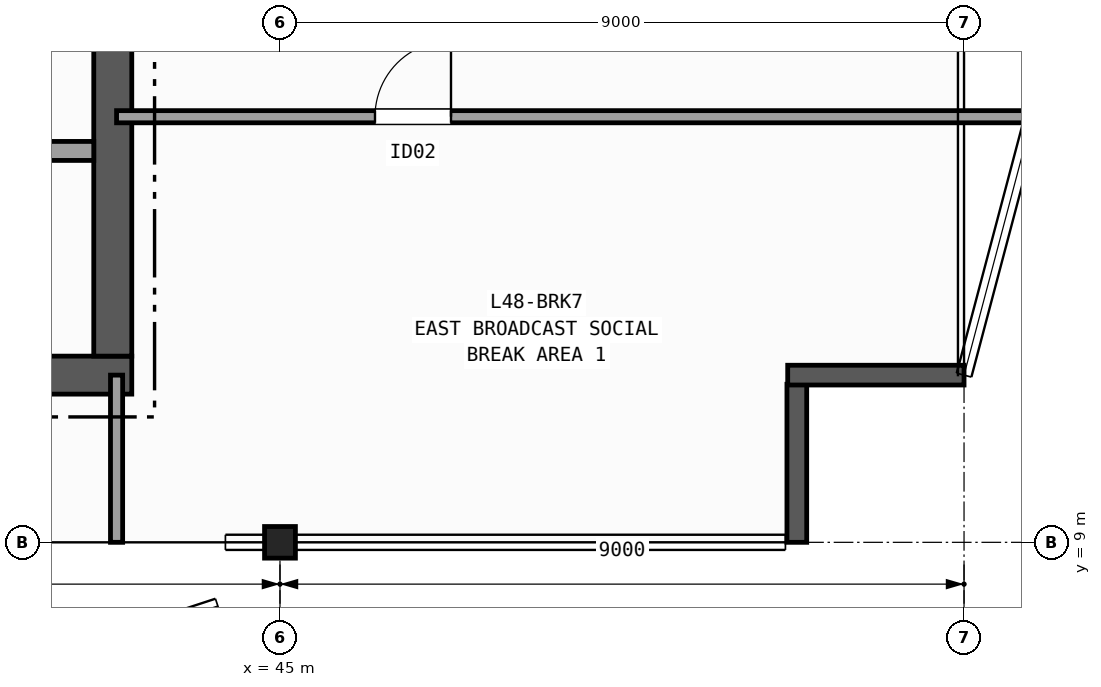
"""IFC4 building model, lengths in metres.
Left out: names, types, materials, properties, quantities, classifications, styles, units other than length and angle.
Written with IfcOpenShell. Run it as: python <this file> out.ifc"""

import sys

from ifc_helpers import new_model, si_unit, direction, frame, frame_2d, origin, origin_2d, place, context, subcontext, project, spatial, rectangle, i_section, extrude, element, fill, save


model = new_model("IFC4")
c1 = context("Model", 3, precision=1e-05, world=origin(), true_north=direction((0.0, 1.0)))
c2 = subcontext(c1, "Body", "Model", "MODEL_VIEW")
j1 = project(units=[si_unit("LENGTHUNIT", "METRE"), si_unit("PLANEANGLEUNIT", "RADIAN")], contexts=[c1])
p1 = place(None, origin())
s1 = spatial("IfcSite", under=j1, at=p1, CompositionType="ELEMENT")
p2 = place(p1, origin())
s2 = spatial("IfcBuilding", under=s1, at=p2, CompositionType="ELEMENT")
p3 = place(p2, frame((0.0, 0.0, 192.7)))
s3 = spatial("IfcBuildingStorey", under=s2, at=p3, CompositionType="ELEMENT", Elevation=192.7)
p4 = place(p3, frame((45.0, 9.0, 0.0), z_axis=(0.0, 0.0, 1.0), x_axis=(1.0, 0.0, 0.0)))
e1 = element("IfcColumn", 1, at=p4, inside=s3, PredefinedType="COLUMN", context=c2, shape_type="SweptSolid", body=[
    extrude(i_section(OverallWidth=0.406, OverallDepth=0.416, WebThickness=0.03, FlangeThickness=0.048, FilletRadius=0.015, at=origin_2d()), origin(), (0.0, 0.0, 1.0), 3.7),
])
p5 = place(p3, frame((51.8, 9.0, 0.0), z_axis=(0.0, 0.0, 1.0), x_axis=(0.0, 1.0, 0.0)))
e2 = element("IfcWall", 2, at=p5, inside=s3, PredefinedType="SOLIDWALL", context=c2, shape_type="SweptSolid", body=[
    extrude(rectangle(XDim=2.08, YDim=0.26, at=frame_2d((1.04, 0.0))), origin(), (0.0, 0.0, 1.0), 3.37),
])
p6 = place(p3, frame((51.68, 11.2, 0.0), z_axis=(0.0, 0.0, 1.0), x_axis=(1.0, 0.0, 0.0)))
e3 = element("IfcWall", 3, at=p6, inside=s3, PredefinedType="SOLIDWALL", context=c2, shape_type="SweptSolid", body=[
    extrude(rectangle(XDim=2.32, YDim=0.26, at=frame_2d((1.16, 0.0))), origin(), (0.0, 0.0, 1.0), 3.37),
])
p7 = place(p3, frame((29.15, 11.2, 0.0), z_axis=(0.0, 0.0, 1.0), x_axis=(1.0, 0.0, 0.0)))
e4 = element("IfcWall", 4, at=p7, inside=s3, PredefinedType="SHEAR", context=c2, shape_type="SweptSolid", body=[
    extrude(rectangle(XDim=13.9, YDim=0.5, at=frame_2d((6.95, 0.0))), origin(), (0.0, 0.0, 1.0), 3.37),
])
p8 = place(p3, frame((42.8, 11.45, 0.0), z_axis=(0.0, 0.0, 1.0), x_axis=(0.0, 1.0, 0.0)))
e5 = element("IfcWall", 5, at=p8, inside=s3, PredefinedType="SHEAR", context=c2, shape_type="SweptSolid", body=[
    extrude(rectangle(XDim=12.9, YDim=0.5, at=frame_2d((6.45, 0.0))), origin(), (0.0, 0.0, 1.0), 3.37),
])
p9 = place(p3, frame((38.2, 14.15, 0.0), z_axis=(0.0, 0.0, 1.0), x_axis=(1.0, 0.0, 0.0)))
e6 = element("IfcWall", 6, at=p9, inside=s3, PredefinedType="PARTITIONING", context=c2, shape_type="SweptSolid", body=[
    extrude(rectangle(XDim=4.35, YDim=0.25, at=frame_2d((2.175, 0.0))), origin(), (0.0, 0.0, 1.0), 3.37),
])
p10 = place(p9, frame((0.925, 0.0, 0.0)))
e7 = element("IfcOpeningElement", 7, at=p10, cuts=e6, PredefinedType="OPENING", context=c2, shape_type="SweptSolid", body=[
    extrude(rectangle(XDim=1.15, YDim=2.15, at=frame_2d((0.575, 1.075))), frame((0.0, 0.135, 0.0), z_axis=(0.0, -1.0, 0.0), x_axis=(1.0, 0.0, 0.0)), (0.0, 0.0, 1.0), 0.27),
])
p11 = place(p3, frame((42.85, 9.0, 0.0), z_axis=(0.0, 0.0, 1.0), x_axis=(0.0, 1.0, 0.0)))
e8 = element("IfcWall", 8, at=p11, inside=s3, PredefinedType="PARTITIONING", context=c2, shape_type="SweptSolid", body=[
    extrude(rectangle(XDim=2.2, YDim=0.16, at=frame_2d((1.1, 0.0))), origin(), (0.0, 0.0, 1.0), 2.584),
])
p12 = place(p3, frame((42.85, 14.6, 0.0), z_axis=(0.0, 0.0, 1.0), x_axis=(1.0, 0.0, 0.0)))
e9 = element("IfcWall", 9, at=p12, inside=s3, PredefinedType="PARTITIONING", context=c2, shape_type="SweptSolid", body=[
    extrude(rectangle(XDim=12.05, YDim=0.16, at=frame_2d((6.025, 0.0))), origin(), (0.0, 0.0, 1.0), 3.37),
])
p13 = place(p12, frame((3.4, 0.0, 0.0)))
e10 = element("IfcOpeningElement", 10, at=p13, cuts=e9, PredefinedType="OPENING", context=c2, shape_type="SweptSolid", body=[
    extrude(rectangle(XDim=1.0, YDim=2.1, at=frame_2d((0.5, 1.05))), frame((0.0, 0.09, 0.0), z_axis=(0.0, -1.0, 0.0), x_axis=(1.0, 0.0, 0.0)), (0.0, 0.0, 1.0), 0.18),
])
p14 = place(p13, origin())
e11 = element("IfcDoor", 11, at=p14, inside=s3, OperationType="SINGLE_SWING_RIGHT", PredefinedType="DOOR", context=c2, shape_type="SweptSolid", body=[
    extrude(rectangle(XDim=1.0, YDim=2.1, at=frame_2d((0.5, 1.05))), frame((0.0, 0.025, 0.0), z_axis=(0.0, -1.0, 0.0), x_axis=(1.0, 0.0, 0.0)), (0.0, 0.0, 1.0), 0.05),
])
fill(e10, e11)
save(model, sys.argv[1])
